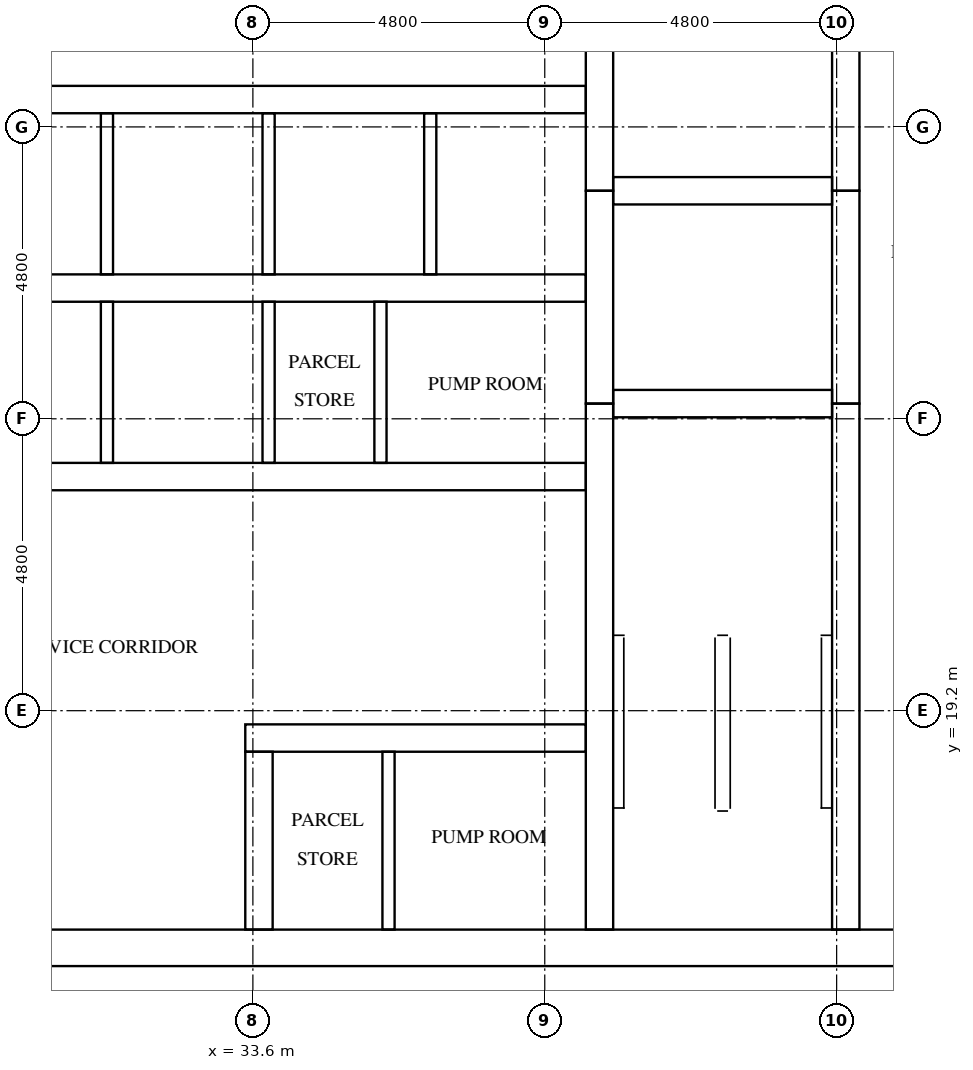
"""IFC4 building model, lengths in metres.
Left out: names, types, materials, properties, quantities, classifications, styles, units other than length and angle.
Written with IfcOpenShell. Run it as: python <this file> out.ifc"""

import sys

from ifc_helpers import new_model, si_unit, direction, frame, frame_2d, origin, place, context, subcontext, project, spatial, rectangle, extrude, element, fill, save


model = new_model("IFC4")
c1 = context("Model", 3, precision=1e-05, world=origin(), true_north=direction((0.0, 1.0)))
c2 = subcontext(c1, "Body", "Model", "MODEL_VIEW")
j1 = project(units=[si_unit("LENGTHUNIT", "METRE"), si_unit("PLANEANGLEUNIT", "RADIAN")], contexts=[c1])
p1 = place(None, origin())
s1 = spatial("IfcSite", under=j1, at=p1, CompositionType="ELEMENT")
p2 = place(p1, origin())
s2 = spatial("IfcBuilding", under=s1, at=p2, CompositionType="ELEMENT")
p3 = place(p2, frame((0.0, 0.0, 245.7)))
s3 = spatial("IfcBuildingStorey", under=s2, at=p3, CompositionType="ELEMENT", Elevation=245.7)
p4 = place(p3, frame((15.0, 15.3, 0.0), z_axis=(0.0, 0.0, 1.0), x_axis=(1.0, 0.0, 0.0)))
e1 = element("IfcWall", 1, at=p4, inside=s3, PredefinedType="SHEAR", context=c2, shape_type="SweptSolid", body=[
    extrude(rectangle(XDim=32.4, YDim=0.6, at=frame_2d((16.2, 0.0))), origin(), (0.0, 0.0, 1.0), 3.2),
])
p5 = place(p4, frame((15.3, 0.0, 0.0)))
e2 = element("IfcOpeningElement", 2, at=p5, cuts=e1, PredefinedType="OPENING", context=c2, shape_type="SweptSolid", body=[
    extrude(rectangle(XDim=1.8, YDim=2.1, at=frame_2d((0.9, 1.05))), frame((0.0, 0.31, 0.0), z_axis=(0.0, -1.0, 0.0), x_axis=(1.0, 0.0, 0.0)), (0.0, 0.0, 1.0), 0.62),
])
p6 = place(p3, frame((39.3, 15.6, 0.0), z_axis=(0.0, 0.0, 1.0), x_axis=(0.0, 1.0, 0.0)))
e3 = element("IfcWall", 3, at=p6, inside=s3, PredefinedType="SHEAR", context=c2, shape_type="SweptSolid", body=[
    extrude(rectangle(XDim=8.65, YDim=0.45, at=frame_2d((4.325, 0.0))), origin(), (0.0, 0.0, 1.0), 3.2),
])
p7 = place(p3, frame((39.3, 24.25, 0.0), z_axis=(0.0, 0.0, 1.0), x_axis=(0.0, 1.0, 0.0)))
e4 = element("IfcWall", 4, at=p7, inside=s3, PredefinedType="SHEAR", context=c2, shape_type="SweptSolid", body=[
    extrude(rectangle(XDim=3.5, YDim=0.45, at=frame_2d((1.75, 0.0))), origin(), (0.0, 0.0, 1.0), 3.2),
])
p8 = place(p3, frame((39.3, 27.75, 0.0), z_axis=(0.0, 0.0, 1.0), x_axis=(0.0, 1.0, 0.0)))
e5 = element("IfcWall", 5, at=p8, inside=s3, PredefinedType="SHEAR", context=c2, shape_type="SweptSolid", body=[
    extrude(rectangle(XDim=9.45, YDim=0.45, at=frame_2d((4.725, 0.0))), origin(), (0.0, 0.0, 1.0), 3.2),
])
p9 = place(p3, frame((43.35, 15.6, 0.0), z_axis=(0.0, 0.0, 1.0), x_axis=(0.0, 1.0, 0.0)))
e6 = element("IfcWall", 6, at=p9, inside=s3, PredefinedType="SHEAR", context=c2, shape_type="SweptSolid", body=[
    extrude(rectangle(XDim=8.65, YDim=0.45, at=frame_2d((4.325, 0.0))), origin(), (0.0, 0.0, 1.0), 3.2),
])
p10 = place(p9, frame((0.6, 0.0, 0.0)))
e7 = element("IfcOpeningElement", 7, at=p10, cuts=e6, PredefinedType="OPENING", context=c2, shape_type="SweptSolid", body=[
    extrude(rectangle(XDim=1.2, YDim=2.1, at=frame_2d((0.6, 1.05))), frame((0.0, 0.235, 0.0), z_axis=(0.0, -1.0, 0.0), x_axis=(1.0, 0.0, 0.0)), (0.0, 0.0, 1.0), 0.47),
])
p11 = place(p3, frame((43.35, 24.25, 0.0), z_axis=(0.0, 0.0, 1.0), x_axis=(0.0, 1.0, 0.0)))
e8 = element("IfcWall", 8, at=p11, inside=s3, PredefinedType="SHEAR", context=c2, shape_type="SweptSolid", body=[
    extrude(rectangle(XDim=3.5, YDim=0.45, at=frame_2d((1.75, 0.0))), origin(), (0.0, 0.0, 1.0), 3.2),
])
p12 = place(p11, frame((1.2, 0.0, 0.0)))
e9 = element("IfcOpeningElement", 9, at=p12, cuts=e8, PredefinedType="OPENING", context=c2, shape_type="SweptSolid", body=[
    extrude(rectangle(XDim=1.1, YDim=2.1, at=frame_2d((0.55, 1.05))), frame((0.0, 0.235, 0.0), z_axis=(0.0, -1.0, 0.0), x_axis=(1.0, 0.0, 0.0)), (0.0, 0.0, 1.0), 0.47),
])
p13 = place(p3, frame((43.35, 27.75, 0.0), z_axis=(0.0, 0.0, 1.0), x_axis=(0.0, 1.0, 0.0)))
e10 = element("IfcWall", 10, at=p13, inside=s3, PredefinedType="SHEAR", context=c2, shape_type="SweptSolid", body=[
    extrude(rectangle(XDim=9.45, YDim=0.45, at=frame_2d((4.725, 0.0))), origin(), (0.0, 0.0, 1.0), 3.2),
])
p14 = place(p13, frame((7.65, 0.0, 0.0)))
e11 = element("IfcOpeningElement", 11, at=p14, cuts=e10, PredefinedType="OPENING", context=c2, shape_type="SweptSolid", body=[
    extrude(rectangle(XDim=1.2, YDim=2.1, at=frame_2d((0.6, 1.05))), frame((0.0, 0.235, 0.0), z_axis=(0.0, -1.0, 0.0), x_axis=(1.0, 0.0, 0.0)), (0.0, 0.0, 1.0), 0.47),
])
for number, where, z_axis, x_axis in (
    (12, (39.525, 24.25, 0.0), (0.0, 0.0, 1.0), (1.0, 0.0, 0.0)),
    (13, (39.525, 27.75, 0.0), (0.0, 0.0, 1.0), (1.0, 0.0, 0.0)),
):
    element("IfcWall", number, at=place(p3, frame(where, z_axis=z_axis, x_axis=x_axis)), inside=s3, PredefinedType="SHEAR", context=c2, shape_type="SweptSolid", body=[
        extrude(rectangle(XDim=3.6, YDim=0.45, at=frame_2d((1.8, 0.0))), origin(), (0.0, 0.0, 1.0), 3.2),
    ])
p15 = place(p3, frame((33.475, 18.75, 0.0), z_axis=(0.0, 0.0, 1.0), x_axis=(1.0, 0.0, 0.0)))
e14 = element("IfcWall", 14, at=p15, inside=s3, PredefinedType="SHEAR", context=c2, shape_type="SweptSolid", body=[
    extrude(rectangle(XDim=5.6, YDim=0.45, at=frame_2d((2.8, 0.0))), origin(), (0.0, 0.0, 1.0), 3.2),
])
p16 = place(p15, frame((0.853, 0.0, 0.0)))
e15 = element("IfcOpeningElement", 15, at=p16, cuts=e14, PredefinedType="OPENING", context=c2, shape_type="SweptSolid", body=[
    extrude(rectangle(XDim=1.0, YDim=2.1, at=frame_2d((0.5, 1.05))), frame((0.0, 0.235, 0.0), z_axis=(0.0, -1.0, 0.0), x_axis=(1.0, 0.0, 0.0)), (0.0, 0.0, 1.0), 0.47),
])
p17 = place(p15, frame((3.528, 0.0, 0.0)))
e16 = element("IfcOpeningElement", 16, at=p17, cuts=e14, PredefinedType="OPENING", context=c2, shape_type="SweptSolid", body=[
    extrude(rectangle(XDim=1.0, YDim=2.1, at=frame_2d((0.5, 1.05))), frame((0.0, 0.235, 0.0), z_axis=(0.0, -1.0, 0.0), x_axis=(1.0, 0.0, 0.0)), (0.0, 0.0, 1.0), 0.47),
])
p18 = place(p3, frame((23.325, 23.05, 0.0), z_axis=(0.0, 0.0, 1.0), x_axis=(1.0, 0.0, 0.0)))
e17 = element("IfcWall", 17, at=p18, inside=s3, PredefinedType="SHEAR", context=c2, shape_type="SweptSolid", body=[
    extrude(rectangle(XDim=15.75, YDim=0.45, at=frame_2d((7.875, 0.0))), origin(), (0.0, 0.0, 1.0), 3.2),
])
p19 = place(p18, frame((0.32, 0.0, 0.0)))
e18 = element("IfcOpeningElement", 18, at=p19, cuts=e17, PredefinedType="OPENING", context=c2, shape_type="SweptSolid", body=[
    extrude(rectangle(XDim=1.0, YDim=2.1, at=frame_2d((0.5, 1.05))), frame((0.0, 0.235, 0.0), z_axis=(0.0, -1.0, 0.0), x_axis=(1.0, 0.0, 0.0)), (0.0, 0.0, 1.0), 0.47),
])
p20 = place(p18, frame((2.978, 0.0, 0.0)))
e19 = element("IfcOpeningElement", 19, at=p20, cuts=e17, PredefinedType="OPENING", context=c2, shape_type="SweptSolid", body=[
    extrude(rectangle(XDim=1.0, YDim=2.1, at=frame_2d((0.5, 1.05))), frame((0.0, 0.235, 0.0), z_axis=(0.0, -1.0, 0.0), x_axis=(1.0, 0.0, 0.0)), (0.0, 0.0, 1.0), 0.47),
])
p21 = place(p18, frame((10.953, 0.0, 0.0)))
e20 = element("IfcOpeningElement", 20, at=p21, cuts=e17, PredefinedType="OPENING", context=c2, shape_type="SweptSolid", body=[
    extrude(rectangle(XDim=1.0, YDim=2.1, at=frame_2d((0.5, 1.05))), frame((0.0, 0.235, 0.0), z_axis=(0.0, -1.0, 0.0), x_axis=(1.0, 0.0, 0.0)), (0.0, 0.0, 1.0), 0.47),
])
p22 = place(p18, frame((13.612, 0.0, 0.0)))
e21 = element("IfcOpeningElement", 21, at=p22, cuts=e17, PredefinedType="OPENING", context=c2, shape_type="SweptSolid", body=[
    extrude(rectangle(XDim=1.0, YDim=2.1, at=frame_2d((0.5, 1.05))), frame((0.0, 0.235, 0.0), z_axis=(0.0, -1.0, 0.0), x_axis=(1.0, 0.0, 0.0)), (0.0, 0.0, 1.0), 0.47),
])
p23 = place(p3, frame((23.325, 26.15, 0.0), z_axis=(0.0, 0.0, 1.0), x_axis=(1.0, 0.0, 0.0)))
e22 = element("IfcWall", 22, at=p23, inside=s3, PredefinedType="SHEAR", context=c2, shape_type="SweptSolid", body=[
    extrude(rectangle(XDim=15.75, YDim=0.45, at=frame_2d((7.875, 0.0))), origin(), (0.0, 0.0, 1.0), 3.2),
])
p24 = place(p3, frame((23.325, 29.25, 0.0), z_axis=(0.0, 0.0, 1.0), x_axis=(1.0, 0.0, 0.0)))
e23 = element("IfcWall", 23, at=p24, inside=s3, PredefinedType="SHEAR", context=c2, shape_type="SweptSolid", body=[
    extrude(rectangle(XDim=15.75, YDim=0.45, at=frame_2d((7.875, 0.0))), origin(), (0.0, 0.0, 1.0), 3.2),
])
p25 = place(p24, frame((0.679, 0.0, 0.0)))
e24 = element("IfcOpeningElement", 24, at=p25, cuts=e23, PredefinedType="OPENING", context=c2, shape_type="SweptSolid", body=[
    extrude(rectangle(XDim=1.1, YDim=2.1, at=frame_2d((0.55, 1.05))), frame((0.0, 0.235, 0.0), z_axis=(0.0, -1.0, 0.0), x_axis=(1.0, 0.0, 0.0)), (0.0, 0.0, 1.0), 0.47),
])
p26 = place(p24, frame((3.337, 0.0, 0.0)))
e25 = element("IfcOpeningElement", 25, at=p26, cuts=e23, PredefinedType="OPENING", context=c2, shape_type="SweptSolid", body=[
    extrude(rectangle(XDim=1.1, YDim=2.1, at=frame_2d((0.55, 1.05))), frame((0.0, 0.235, 0.0), z_axis=(0.0, -1.0, 0.0), x_axis=(1.0, 0.0, 0.0)), (0.0, 0.0, 1.0), 0.47),
])
p27 = place(p24, frame((5.996, 0.0, 0.0)))
e26 = element("IfcOpeningElement", 26, at=p27, cuts=e23, PredefinedType="OPENING", context=c2, shape_type="SweptSolid", body=[
    extrude(rectangle(XDim=1.1, YDim=2.1, at=frame_2d((0.55, 1.05))), frame((0.0, 0.235, 0.0), z_axis=(0.0, -1.0, 0.0), x_axis=(1.0, 0.0, 0.0)), (0.0, 0.0, 1.0), 0.47),
])
p28 = place(p24, frame((8.654, 0.0, 0.0)))
e27 = element("IfcOpeningElement", 27, at=p28, cuts=e23, PredefinedType="OPENING", context=c2, shape_type="SweptSolid", body=[
    extrude(rectangle(XDim=1.1, YDim=2.1, at=frame_2d((0.55, 1.05))), frame((0.0, 0.235, 0.0), z_axis=(0.0, -1.0, 0.0), x_axis=(1.0, 0.0, 0.0)), (0.0, 0.0, 1.0), 0.47),
])
p29 = place(p24, frame((11.312, 0.0, 0.0)))
e28 = element("IfcOpeningElement", 28, at=p29, cuts=e23, PredefinedType="OPENING", context=c2, shape_type="SweptSolid", body=[
    extrude(rectangle(XDim=1.1, YDim=2.1, at=frame_2d((0.55, 1.05))), frame((0.0, 0.235, 0.0), z_axis=(0.0, -1.0, 0.0), x_axis=(1.0, 0.0, 0.0)), (0.0, 0.0, 1.0), 0.47),
])
p30 = place(p24, frame((13.971, 0.0, 0.0)))
e29 = element("IfcOpeningElement", 29, at=p30, cuts=e23, PredefinedType="OPENING", context=c2, shape_type="SweptSolid", body=[
    extrude(rectangle(XDim=1.1, YDim=2.1, at=frame_2d((0.55, 1.05))), frame((0.0, 0.235, 0.0), z_axis=(0.0, -1.0, 0.0), x_axis=(1.0, 0.0, 0.0)), (0.0, 0.0, 1.0), 0.47),
])
p31 = place(p3, frame((33.7, 15.6, 0.0), z_axis=(0.0, 0.0, 1.0), x_axis=(0.0, 1.0, 0.0)))
e30 = element("IfcWall", 30, at=p31, inside=s3, PredefinedType="SHEAR", context=c2, shape_type="SweptSolid", body=[
    extrude(rectangle(XDim=2.925, YDim=0.45, at=frame_2d((1.462, 0.0))), origin(), (0.0, 0.0, 1.0), 3.2),
])
p32 = place(p3, frame((31.2, 23.275, 0.0), z_axis=(0.0, 0.0, 1.0), x_axis=(0.0, 1.0, 0.0)))
e31 = element("IfcWall", 31, at=p32, inside=s3, PredefinedType="SOLIDWALL", context=c2, shape_type="SweptSolid", body=[
    extrude(rectangle(XDim=2.65, YDim=0.2, at=frame_2d((1.325, 0.0))), origin(), (0.0, 0.0, 1.0), 3.2),
])
p33 = place(p3, frame((31.2, 26.375, 0.0), z_axis=(0.0, 0.0, 1.0), x_axis=(0.0, 1.0, 0.0)))
e32 = element("IfcWall", 32, at=p33, inside=s3, PredefinedType="SOLIDWALL", context=c2, shape_type="SweptSolid", body=[
    extrude(rectangle(XDim=2.65, YDim=0.2, at=frame_2d((1.325, 0.0))), origin(), (0.0, 0.0, 1.0), 3.2),
])
p34 = place(p3, frame((33.858, 23.275, 0.0), z_axis=(0.0, 0.0, 1.0), x_axis=(0.0, 1.0, 0.0)))
e33 = element("IfcWall", 33, at=p34, inside=s3, PredefinedType="SOLIDWALL", context=c2, shape_type="SweptSolid", body=[
    extrude(rectangle(XDim=2.65, YDim=0.2, at=frame_2d((1.325, 0.0))), origin(), (0.0, 0.0, 1.0), 3.2),
])
for number, where, z_axis, x_axis in (
    (34, (33.858, 26.375, 0.0), (0.0, 0.0, 1.0), (0.0, 1.0, 0.0)),
    (35, (36.517, 26.375, 0.0), (0.0, 0.0, 1.0), (0.0, 1.0, 0.0)),
):
    element("IfcWall", number, at=place(p3, frame(where, z_axis=z_axis, x_axis=x_axis)), inside=s3, PredefinedType="SOLIDWALL", context=c2, shape_type="SweptSolid", body=[
        extrude(rectangle(XDim=2.65, YDim=0.2, at=frame_2d((1.325, 0.0))), origin(), (0.0, 0.0, 1.0), 3.2),
    ])
p35 = place(p3, frame((35.698, 23.275, 0.0), z_axis=(0.0, 0.0, 1.0), x_axis=(0.0, 1.0, 0.0)))
e36 = element("IfcWall", 36, at=p35, inside=s3, PredefinedType="PARTITIONING", context=c2, shape_type="SweptSolid", body=[
    extrude(rectangle(XDim=2.65, YDim=0.2, at=frame_2d((1.325, 0.0))), origin(), (0.0, 0.0, 1.0), 3.2),
])
p36 = place(p3, frame((35.831, 15.6, 0.0), z_axis=(0.0, 0.0, 1.0), x_axis=(0.0, 1.0, 0.0)))
e37 = element("IfcWall", 37, at=p36, inside=s3, PredefinedType="PARTITIONING", context=c2, shape_type="SweptSolid", body=[
    extrude(rectangle(XDim=2.925, YDim=0.2, at=frame_2d((1.462, 0.0))), origin(), (0.0, 0.0, 1.0), 3.2),
])
p37 = place(p27, origin())
e38 = element("IfcDoor", 38, at=p37, inside=s3, OperationType="DOUBLE_DOOR_SLIDING", PredefinedType="DOOR", context=c2, shape_type="SweptSolid", body=[
    extrude(rectangle(XDim=1.1, YDim=2.1, at=frame_2d((0.55, 1.05))), frame((0.0, 0.025, 0.0), z_axis=(0.0, -1.0, 0.0), x_axis=(1.0, 0.0, 0.0)), (0.0, 0.0, 1.0), 0.05),
])
fill(e26, e38)
p38 = place(p28, origin())
e39 = element("IfcDoor", 39, at=p38, inside=s3, OperationType="DOUBLE_DOOR_SLIDING", PredefinedType="DOOR", context=c2, shape_type="SweptSolid", body=[
    extrude(rectangle(XDim=1.1, YDim=2.1, at=frame_2d((0.55, 1.05))), frame((0.0, 0.025, 0.0), z_axis=(0.0, -1.0, 0.0), x_axis=(1.0, 0.0, 0.0)), (0.0, 0.0, 1.0), 0.05),
])
fill(e27, e39)
p39 = place(p29, origin())
e40 = element("IfcDoor", 40, at=p39, inside=s3, OperationType="DOUBLE_DOOR_SLIDING", PredefinedType="DOOR", context=c2, shape_type="SweptSolid", body=[
    extrude(rectangle(XDim=1.1, YDim=2.1, at=frame_2d((0.55, 1.05))), frame((0.0, 0.025, 0.0), z_axis=(0.0, -1.0, 0.0), x_axis=(1.0, 0.0, 0.0)), (0.0, 0.0, 1.0), 0.05),
])
fill(e28, e40)
p40 = place(p30, origin())
e41 = element("IfcDoor", 41, at=p40, inside=s3, OperationType="DOUBLE_DOOR_SLIDING", PredefinedType="DOOR", context=c2, shape_type="SweptSolid", body=[
    extrude(rectangle(XDim=1.1, YDim=2.1, at=frame_2d((0.55, 1.05))), frame((0.0, 0.025, 0.0), z_axis=(0.0, -1.0, 0.0), x_axis=(1.0, 0.0, 0.0)), (0.0, 0.0, 1.0), 0.05),
])
fill(e29, e41)
p41 = place(p12, origin())
e42 = element("IfcDoor", 42, at=p41, inside=s3, OperationType="DOUBLE_DOOR_SLIDING", PredefinedType="DOOR", context=c2, shape_type="SweptSolid", body=[
    extrude(rectangle(XDim=1.1, YDim=2.1, at=frame_2d((0.55, 1.05))), frame((0.0, 0.025, 0.0), z_axis=(0.0, -1.0, 0.0), x_axis=(1.0, 0.0, 0.0)), (0.0, 0.0, 1.0), 0.05),
])
fill(e9, e42)
p42 = place(p10, origin())
e43 = element("IfcDoor", 43, at=p42, inside=s3, OperationType="SINGLE_SWING_LEFT", PredefinedType="DOOR", context=c2, shape_type="SweptSolid", body=[
    extrude(rectangle(XDim=1.2, YDim=2.1, at=frame_2d((0.6, 1.05))), frame((0.0, 0.025, 0.0), z_axis=(0.0, -1.0, 0.0), x_axis=(1.0, 0.0, 0.0)), (0.0, 0.0, 1.0), 0.05),
])
fill(e7, e43)
p43 = place(p5, frame((1.8, 0.0, 0.0), z_axis=(0.0, 0.0, 1.0), x_axis=(-1.0, 0.0, 0.0)))
e44 = element("IfcDoor", 44, at=p43, inside=s3, OperationType="DOUBLE_DOOR_SINGLE_SWING", PredefinedType="DOOR", context=c2, shape_type="SweptSolid", body=[
    extrude(rectangle(XDim=1.8, YDim=2.1, at=frame_2d((0.9, 1.05))), frame((0.0, 0.025, 0.0), z_axis=(0.0, -1.0, 0.0), x_axis=(1.0, 0.0, 0.0)), (0.0, 0.0, 1.0), 0.05),
])
fill(e2, e44)
p44 = place(p21, frame((1.0, 0.0, 0.0), z_axis=(0.0, 0.0, 1.0), x_axis=(-1.0, 0.0, 0.0)))
e45 = element("IfcDoor", 45, at=p44, inside=s3, OperationType="SINGLE_SWING_LEFT", PredefinedType="DOOR", context=c2, shape_type="SweptSolid", body=[
    extrude(rectangle(XDim=1.0, YDim=2.1, at=frame_2d((0.5, 1.05))), frame((0.0, 0.025, 0.0), z_axis=(0.0, -1.0, 0.0), x_axis=(1.0, 0.0, 0.0)), (0.0, 0.0, 1.0), 0.05),
])
fill(e20, e45)
p45 = place(p22, frame((1.0, 0.0, 0.0), z_axis=(0.0, 0.0, 1.0), x_axis=(-1.0, 0.0, 0.0)))
e46 = element("IfcDoor", 46, at=p45, inside=s3, OperationType="SINGLE_SWING_RIGHT", PredefinedType="DOOR", context=c2, shape_type="SweptSolid", body=[
    extrude(rectangle(XDim=1.0, YDim=2.1, at=frame_2d((0.5, 1.05))), frame((0.0, 0.025, 0.0), z_axis=(0.0, -1.0, 0.0), x_axis=(1.0, 0.0, 0.0)), (0.0, 0.0, 1.0), 0.05),
])
fill(e21, e46)
p46 = place(p16, origin())
e47 = element("IfcDoor", 47, at=p46, inside=s3, OperationType="SINGLE_SWING_LEFT", PredefinedType="DOOR", context=c2, shape_type="SweptSolid", body=[
    extrude(rectangle(XDim=1.0, YDim=2.1, at=frame_2d((0.5, 1.05))), frame((0.0, 0.025, 0.0), z_axis=(0.0, -1.0, 0.0), x_axis=(1.0, 0.0, 0.0)), (0.0, 0.0, 1.0), 0.05),
])
fill(e15, e47)
p47 = place(p17, origin())
e48 = element("IfcDoor", 48, at=p47, inside=s3, OperationType="SINGLE_SWING_RIGHT", PredefinedType="DOOR", context=c2, shape_type="SweptSolid", body=[
    extrude(rectangle(XDim=1.0, YDim=2.1, at=frame_2d((0.5, 1.05))), frame((0.0, 0.025, 0.0), z_axis=(0.0, -1.0, 0.0), x_axis=(1.0, 0.0, 0.0)), (0.0, 0.0, 1.0), 0.05),
])
fill(e16, e48)
save(model, sys.argv[1])
